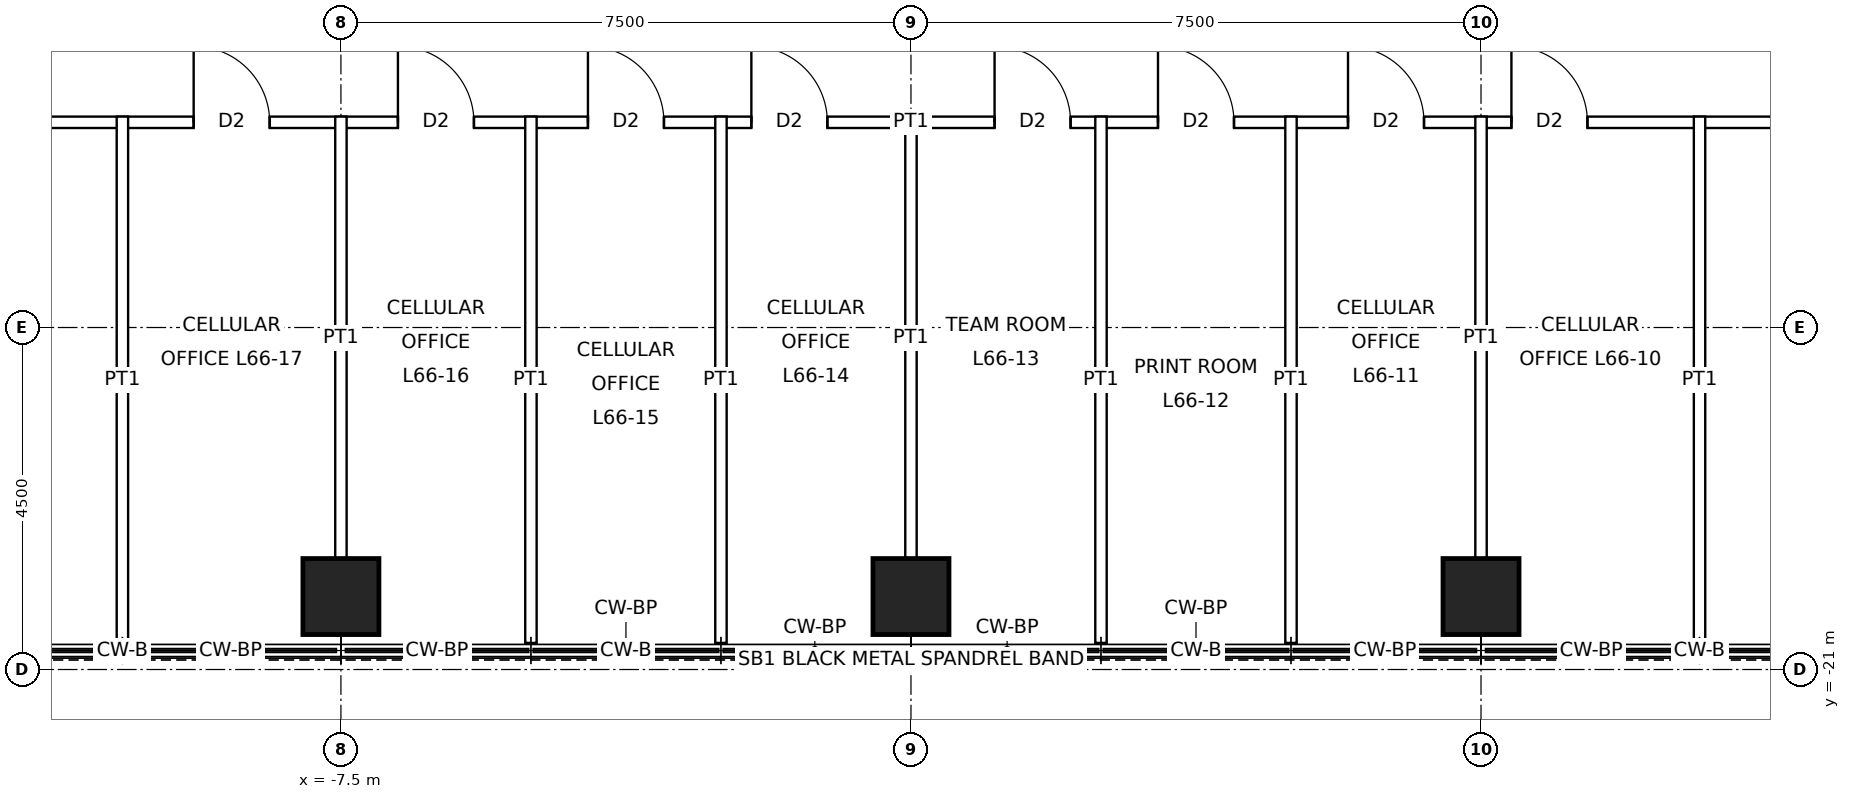
"""IFC4 building model, lengths in metres.
Left out: names, types, materials, properties, quantities, classifications, styles, units other than length and angle.
Written with IfcOpenShell. Run it as: python <this file> out.ifc"""

import sys

from ifc_helpers import new_model, si_unit, direction, frame, frame_2d, origin, origin_2d, place, context, subcontext, project, spatial, rectangle, hollow_rectangle, extrude, element, fill, save


model = new_model("IFC4")
c1 = context("Model", 3, precision=1e-05, world=origin(), true_north=direction((0.0, 1.0)))
c2 = subcontext(c1, "Body", "Model", "MODEL_VIEW")
j1 = project(units=[si_unit("LENGTHUNIT", "METRE"), si_unit("PLANEANGLEUNIT", "RADIAN")], contexts=[c1])
p1 = place(None, origin())
s1 = spatial("IfcSite", under=j1, at=p1, CompositionType="ELEMENT")
p2 = place(p1, origin())
s2 = spatial("IfcBuilding", under=s1, at=p2, CompositionType="ELEMENT")
p3 = place(p2, frame((0.0, 0.0, 299.9)))
s3 = spatial("IfcBuildingStorey", under=s2, at=p3, CompositionType="ELEMENT", Elevation=299.9)
for number, where, z_axis, x_axis in (
    (1, (7.5, -20.04, 0.0), (0.0, 0.0, 1.0), (1.0, 0.0, 0.0)),
    (2, (0.0, -20.04, 0.0), (0.0, 0.0, 1.0), (1.0, 0.0, 0.0)),
    (3, (-7.5, -20.04, 0.0), (0.0, 0.0, 1.0), (1.0, 0.0, 0.0)),
):
    element("IfcColumn", number, at=place(p3, frame(where, z_axis=z_axis, x_axis=x_axis)), inside=s3, PredefinedType="COLUMN", context=c2, shape_type="SweptSolid", body=[
        extrude(hollow_rectangle(XDim=1.0, YDim=1.0, WallThickness=0.075, at=origin_2d()), origin(), (0.0, 0.0, 1.0), 4.0),
    ])
p4 = place(p3, frame((-13.875, -13.8, 0.0), z_axis=(0.0, 0.0, 1.0), x_axis=(1.0, 0.0, 0.0)))
e4 = element("IfcWall", 4, at=p4, inside=s3, PredefinedType="PARTITIONING", context=c2, shape_type="SweptSolid", body=[
    extrude(rectangle(XDim=27.75, YDim=0.15, at=frame_2d((13.875, 0.0))), origin(), (0.0, 0.0, 1.0), 3.85),
])
p5 = place(p4, frame((21.775, 0.0, 0.0)))
e5 = element("IfcOpeningElement", 5, at=p5, cuts=e4, PredefinedType="OPENING", context=c2, shape_type="SweptSolid", body=[
    extrude(rectangle(XDim=1.0, YDim=2.1, at=frame_2d((0.5, 1.05))), frame((0.0, 0.085, 0.0), z_axis=(0.0, -1.0, 0.0), x_axis=(1.0, 0.0, 0.0)), (0.0, 0.0, 1.0), 0.17),
])
p6 = place(p4, frame((19.625, 0.0, 0.0)))
e6 = element("IfcOpeningElement", 6, at=p6, cuts=e4, PredefinedType="OPENING", context=c2, shape_type="SweptSolid", body=[
    extrude(rectangle(XDim=1.0, YDim=2.1, at=frame_2d((0.5, 1.05))), frame((0.0, 0.085, 0.0), z_axis=(0.0, -1.0, 0.0), x_axis=(1.0, 0.0, 0.0)), (0.0, 0.0, 1.0), 0.17),
])
p7 = place(p4, frame((17.125, 0.0, 0.0)))
e7 = element("IfcOpeningElement", 7, at=p7, cuts=e4, PredefinedType="OPENING", context=c2, shape_type="SweptSolid", body=[
    extrude(rectangle(XDim=1.0, YDim=2.1, at=frame_2d((0.5, 1.05))), frame((0.0, 0.085, 0.0), z_axis=(0.0, -1.0, 0.0), x_axis=(1.0, 0.0, 0.0)), (0.0, 0.0, 1.0), 0.17),
])
p8 = place(p4, frame((14.975, 0.0, 0.0)))
e8 = element("IfcOpeningElement", 8, at=p8, cuts=e4, PredefinedType="OPENING", context=c2, shape_type="SweptSolid", body=[
    extrude(rectangle(XDim=1.0, YDim=2.1, at=frame_2d((0.5, 1.05))), frame((0.0, 0.085, 0.0), z_axis=(0.0, -1.0, 0.0), x_axis=(1.0, 0.0, 0.0)), (0.0, 0.0, 1.0), 0.17),
])
p9 = place(p4, frame((11.775, 0.0, 0.0)))
e9 = element("IfcOpeningElement", 9, at=p9, cuts=e4, PredefinedType="OPENING", context=c2, shape_type="SweptSolid", body=[
    extrude(rectangle(XDim=1.0, YDim=2.1, at=frame_2d((0.5, 1.05))), frame((0.0, 0.085, 0.0), z_axis=(0.0, -1.0, 0.0), x_axis=(1.0, 0.0, 0.0)), (0.0, 0.0, 1.0), 0.17),
])
p10 = place(p4, frame((9.625, 0.0, 0.0)))
e10 = element("IfcOpeningElement", 10, at=p10, cuts=e4, PredefinedType="OPENING", context=c2, shape_type="SweptSolid", body=[
    extrude(rectangle(XDim=1.0, YDim=2.1, at=frame_2d((0.5, 1.05))), frame((0.0, 0.085, 0.0), z_axis=(0.0, -1.0, 0.0), x_axis=(1.0, 0.0, 0.0)), (0.0, 0.0, 1.0), 0.17),
])
p11 = place(p4, frame((7.125, 0.0, 0.0)))
e11 = element("IfcOpeningElement", 11, at=p11, cuts=e4, PredefinedType="OPENING", context=c2, shape_type="SweptSolid", body=[
    extrude(rectangle(XDim=1.0, YDim=2.1, at=frame_2d((0.5, 1.05))), frame((0.0, 0.085, 0.0), z_axis=(0.0, -1.0, 0.0), x_axis=(1.0, 0.0, 0.0)), (0.0, 0.0, 1.0), 0.17),
])
p12 = place(p4, frame((4.438, 0.0, 0.0)))
e12 = element("IfcOpeningElement", 12, at=p12, cuts=e4, PredefinedType="OPENING", context=c2, shape_type="SweptSolid", body=[
    extrude(rectangle(XDim=1.0, YDim=2.1, at=frame_2d((0.5, 1.05))), frame((0.0, 0.085, 0.0), z_axis=(0.0, -1.0, 0.0), x_axis=(1.0, 0.0, 0.0)), (0.0, 0.0, 1.0), 0.17),
])
p13 = place(p4, frame((25.625, 0.0, 0.0)))
e13 = element("IfcOpeningElement", 13, at=p13, cuts=e4, PredefinedType="OPENING", context=c2, shape_type="SweptSolid", body=[
    extrude(rectangle(XDim=1.0, YDim=2.4, at=frame_2d((0.5, 1.2))), frame((0.0, 0.085, 0.0), z_axis=(0.0, -1.0, 0.0), x_axis=(1.0, 0.0, 0.0)), (0.0, 0.0, 1.0), 0.17),
])
p14 = place(p4, frame((1.288, 0.0, 0.0)))
e14 = element("IfcOpeningElement", 14, at=p14, cuts=e4, PredefinedType="OPENING", context=c2, shape_type="SweptSolid", body=[
    extrude(rectangle(XDim=1.0, YDim=2.4, at=frame_2d((0.5, 1.2))), frame((0.0, 0.085, 0.0), z_axis=(0.0, -1.0, 0.0), x_axis=(1.0, 0.0, 0.0)), (0.0, 0.0, 1.0), 0.17),
])
p15 = place(p3, frame((-10.375, -20.65, 0.0), z_axis=(0.0, 0.0, 1.0), x_axis=(0.0, 1.0, 0.0)))
e15 = element("IfcWall", 15, at=p15, inside=s3, PredefinedType="PARTITIONING", context=c2, shape_type="SweptSolid", body=[
    extrude(rectangle(XDim=6.925, YDim=0.15, at=frame_2d((3.462, 0.0))), origin(), (0.0, 0.0, 1.0), 3.85),
])
p16 = place(p3, frame((-7.5, -19.54, 0.0), z_axis=(0.0, 0.0, 1.0), x_axis=(0.0, 1.0, 0.0)))
e16 = element("IfcWall", 16, at=p16, inside=s3, PredefinedType="PARTITIONING", context=c2, shape_type="SweptSolid", body=[
    extrude(rectangle(XDim=5.815, YDim=0.15, at=frame_2d((2.907, 0.0))), origin(), (0.0, 0.0, 1.0), 3.243),
])
for number, where, z_axis, x_axis in (
    (17, (-5.0, -20.65, 0.0), (0.0, 0.0, 1.0), (0.0, 1.0, 0.0)),
    (18, (-2.5, -20.65, 0.0), (0.0, 0.0, 1.0), (0.0, 1.0, 0.0)),
):
    element("IfcWall", number, at=place(p3, frame(where, z_axis=z_axis, x_axis=x_axis)), inside=s3, PredefinedType="PARTITIONING", context=c2, shape_type="SweptSolid", body=[
        extrude(rectangle(XDim=6.925, YDim=0.15, at=frame_2d((3.462, 0.0))), origin(), (0.0, 0.0, 1.0), 3.85),
    ])
p17 = place(p3, frame((0.0, -19.54, 0.0), z_axis=(0.0, 0.0, 1.0), x_axis=(0.0, 1.0, 0.0)))
e19 = element("IfcWall", 19, at=p17, inside=s3, PredefinedType="PARTITIONING", context=c2, shape_type="SweptSolid", body=[
    extrude(rectangle(XDim=5.815, YDim=0.15, at=frame_2d((2.907, 0.0))), origin(), (0.0, 0.0, 1.0), 3.243),
])
for number, where, z_axis, x_axis in (
    (20, (2.5, -20.65, 0.0), (0.0, 0.0, 1.0), (0.0, 1.0, 0.0)),
    (21, (5.0, -20.65, 0.0), (0.0, 0.0, 1.0), (0.0, 1.0, 0.0)),
):
    element("IfcWall", number, at=place(p3, frame(where, z_axis=z_axis, x_axis=x_axis)), inside=s3, PredefinedType="PARTITIONING", context=c2, shape_type="SweptSolid", body=[
        extrude(rectangle(XDim=6.925, YDim=0.15, at=frame_2d((3.462, 0.0))), origin(), (0.0, 0.0, 1.0), 3.85),
    ])
p18 = place(p3, frame((7.5, -19.54, 0.0), z_axis=(0.0, 0.0, 1.0), x_axis=(0.0, 1.0, 0.0)))
e22 = element("IfcWall", 22, at=p18, inside=s3, PredefinedType="PARTITIONING", context=c2, shape_type="SweptSolid", body=[
    extrude(rectangle(XDim=5.815, YDim=0.15, at=frame_2d((2.907, 0.0))), origin(), (0.0, 0.0, 1.0), 3.243),
])
p19 = place(p3, frame((10.375, -20.65, 0.0), z_axis=(0.0, 0.0, 1.0), x_axis=(0.0, 1.0, 0.0)))
e23 = element("IfcWall", 23, at=p19, inside=s3, PredefinedType="PARTITIONING", context=c2, shape_type="SweptSolid", body=[
    extrude(rectangle(XDim=6.925, YDim=0.15, at=frame_2d((3.462, 0.0))), origin(), (0.0, 0.0, 1.0), 3.85),
])
p20 = place(p5, origin())
e24 = element("IfcDoor", 24, at=p20, inside=s3, OperationType="SINGLE_SWING_LEFT", PredefinedType="DOOR", context=c2, shape_type="SweptSolid", body=[
    extrude(rectangle(XDim=1.0, YDim=2.1, at=frame_2d((0.5, 1.05))), frame((0.0, 0.025, 0.0), z_axis=(0.0, -1.0, 0.0), x_axis=(1.0, 0.0, 0.0)), (0.0, 0.0, 1.0), 0.05),
])
fill(e5, e24)
p21 = place(p6, origin())
e25 = element("IfcDoor", 25, at=p21, inside=s3, OperationType="SINGLE_SWING_LEFT", PredefinedType="DOOR", context=c2, shape_type="SweptSolid", body=[
    extrude(rectangle(XDim=1.0, YDim=2.1, at=frame_2d((0.5, 1.05))), frame((0.0, 0.025, 0.0), z_axis=(0.0, -1.0, 0.0), x_axis=(1.0, 0.0, 0.0)), (0.0, 0.0, 1.0), 0.05),
])
fill(e6, e25)
p22 = place(p7, origin())
e26 = element("IfcDoor", 26, at=p22, inside=s3, OperationType="SINGLE_SWING_LEFT", PredefinedType="DOOR", context=c2, shape_type="SweptSolid", body=[
    extrude(rectangle(XDim=1.0, YDim=2.1, at=frame_2d((0.5, 1.05))), frame((0.0, 0.025, 0.0), z_axis=(0.0, -1.0, 0.0), x_axis=(1.0, 0.0, 0.0)), (0.0, 0.0, 1.0), 0.05),
])
fill(e7, e26)
p23 = place(p8, origin())
e27 = element("IfcDoor", 27, at=p23, inside=s3, OperationType="SINGLE_SWING_LEFT", PredefinedType="DOOR", context=c2, shape_type="SweptSolid", body=[
    extrude(rectangle(XDim=1.0, YDim=2.1, at=frame_2d((0.5, 1.05))), frame((0.0, 0.025, 0.0), z_axis=(0.0, -1.0, 0.0), x_axis=(1.0, 0.0, 0.0)), (0.0, 0.0, 1.0), 0.05),
])
fill(e8, e27)
p24 = place(p9, origin())
e28 = element("IfcDoor", 28, at=p24, inside=s3, OperationType="SINGLE_SWING_LEFT", PredefinedType="DOOR", context=c2, shape_type="SweptSolid", body=[
    extrude(rectangle(XDim=1.0, YDim=2.1, at=frame_2d((0.5, 1.05))), frame((0.0, 0.025, 0.0), z_axis=(0.0, -1.0, 0.0), x_axis=(1.0, 0.0, 0.0)), (0.0, 0.0, 1.0), 0.05),
])
fill(e9, e28)
p25 = place(p10, origin())
e29 = element("IfcDoor", 29, at=p25, inside=s3, OperationType="SINGLE_SWING_LEFT", PredefinedType="DOOR", context=c2, shape_type="SweptSolid", body=[
    extrude(rectangle(XDim=1.0, YDim=2.1, at=frame_2d((0.5, 1.05))), frame((0.0, 0.025, 0.0), z_axis=(0.0, -1.0, 0.0), x_axis=(1.0, 0.0, 0.0)), (0.0, 0.0, 1.0), 0.05),
])
fill(e10, e29)
p26 = place(p11, origin())
e30 = element("IfcDoor", 30, at=p26, inside=s3, OperationType="SINGLE_SWING_LEFT", PredefinedType="DOOR", context=c2, shape_type="SweptSolid", body=[
    extrude(rectangle(XDim=1.0, YDim=2.1, at=frame_2d((0.5, 1.05))), frame((0.0, 0.025, 0.0), z_axis=(0.0, -1.0, 0.0), x_axis=(1.0, 0.0, 0.0)), (0.0, 0.0, 1.0), 0.05),
])
fill(e11, e30)
p27 = place(p12, origin())
e31 = element("IfcDoor", 31, at=p27, inside=s3, OperationType="SINGLE_SWING_LEFT", PredefinedType="DOOR", context=c2, shape_type="SweptSolid", body=[
    extrude(rectangle(XDim=1.0, YDim=2.1, at=frame_2d((0.5, 1.05))), frame((0.0, 0.025, 0.0), z_axis=(0.0, -1.0, 0.0), x_axis=(1.0, 0.0, 0.0)), (0.0, 0.0, 1.0), 0.05),
])
fill(e12, e31)
save(model, sys.argv[1])
